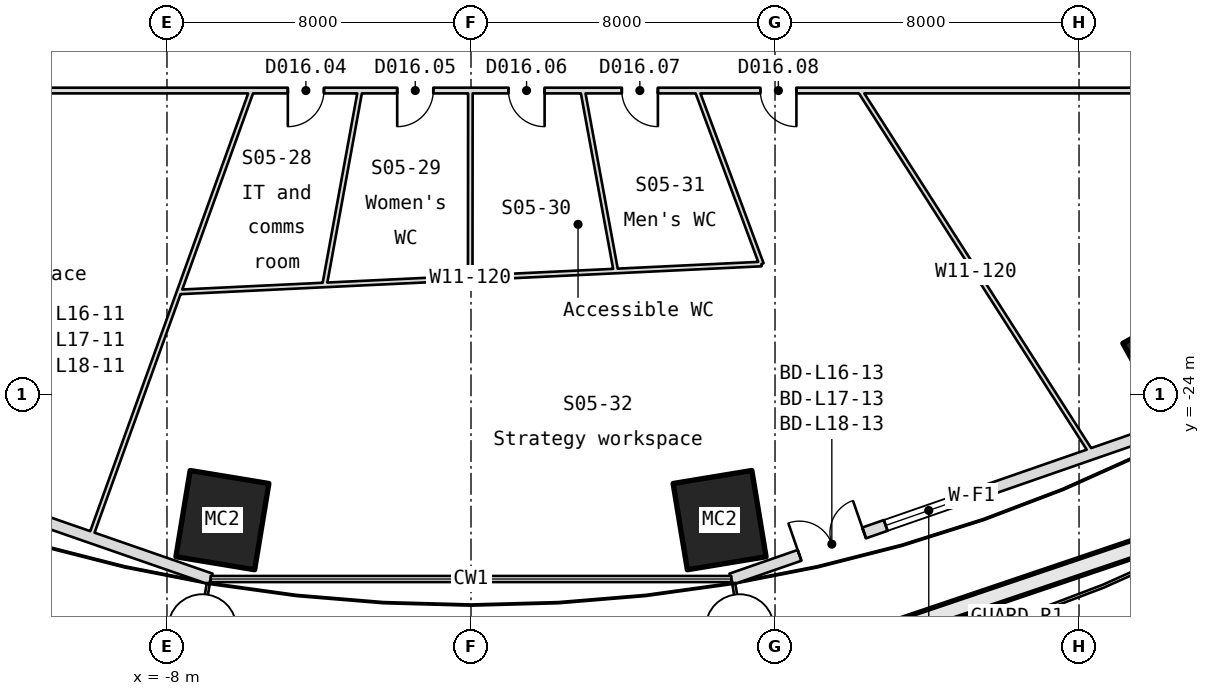
"""IFC4 building model, lengths in metres.
Left out: names, types, materials, properties, quantities, classifications, styles, units other than length and angle.
Written with IfcOpenShell. Run it as: python <this file> out.ifc"""

import sys

from ifc_helpers import new_model, si_unit, direction, frame, frame_2d, origin, origin_2d, place, context, subcontext, project, spatial, rectangle, hollow_rectangle, extrude, element, fill, save


model = new_model("IFC4")
c1 = context("Model", 3, precision=1e-05, world=origin(), true_north=direction((0.0, 1.0)))
c2 = subcontext(c1, "Body", "Model", "MODEL_VIEW")
j1 = project(units=[si_unit("LENGTHUNIT", "METRE"), si_unit("PLANEANGLEUNIT", "RADIAN")], contexts=[c1])
p1 = place(None, origin())
s1 = spatial("IfcSite", under=j1, at=p1, CompositionType="ELEMENT")
p2 = place(p1, origin())
s2 = spatial("IfcBuilding", under=s1, at=p2, CompositionType="ELEMENT")
p3 = place(p2, frame((0.0, 0.0, 82.8)))
s3 = spatial("IfcBuildingStorey", under=s2, at=p3, CompositionType="ELEMENT", Elevation=82.8)
for number, where, z_axis, x_axis in (
    (1, (-6.542, -27.303, -0.18), (0.0, 0.0, 1.0), (-0.987, 0.163, 0.0)),
    (2, (6.542, -27.303, -0.18), (0.0, 0.0, 1.0), (-0.987, -0.163, 0.0)),
    (3, (18.629, -23.146, -0.18), (0.0, 0.0, 1.0), (-0.874, -0.485, 0.0)),
):
    element("IfcColumn", number, at=place(p3, frame(where, z_axis=z_axis, x_axis=x_axis)), inside=s3, PredefinedType="COLUMN", context=c2, shape_type="SweptSolid", body=[
        extrude(hollow_rectangle(XDim=2.1, YDim=2.3, WallThickness=0.085, at=origin_2d()), origin(), (0.0, 0.0, 1.0), 4.15),
    ])
p4 = place(p3, frame((-19.507, -24.46, 0.0), z_axis=(0.0, 0.0, 1.0), x_axis=(0.944722748464, -0.327870292241, 0.0)))
e4 = element("IfcWall", 4, at=p4, inside=s3, PredefinedType="SOLIDWALL", context=c2, shape_type="SweptSolid", body=[
    extrude(rectangle(XDim=13.397, YDim=0.3, at=frame_2d((6.699, 0.0))), origin(), (0.0, 0.0, 1.0), 3.97),
])
p5 = place(p4, frame((1.9, 0.0, 0.0)))
e5 = element("IfcOpeningElement", 5, at=p5, cuts=e4, PredefinedType="OPENING", context=c2, shape_type="SweptSolid", body=[
    extrude(rectangle(XDim=1.8, YDim=2.4, at=frame_2d((0.9, 1.2))), frame((0.0, 0.16, 0.0), z_axis=(0.0, -1.0, 0.0), x_axis=(1.0, 0.0, 0.0)), (0.0, 0.0, 1.0), 0.32),
])
p6 = place(p4, frame((4.3, 0.0, 0.9)))
e6 = element("IfcOpeningElement", 6, at=p6, cuts=e4, PredefinedType="OPENING", context=c2, shape_type="SweptSolid", body=[
    extrude(rectangle(XDim=2.4, YDim=1.5, at=frame_2d((1.2, 0.75))), frame((0.0, 0.16, 0.0), z_axis=(0.0, -1.0, 0.0), x_axis=(1.0, 0.0, 0.0)), (0.0, 0.0, 1.0), 0.32),
])
p7 = place(p3, frame((6.85, -28.853, 0.0), z_axis=(0.0, 0.0, 1.0), x_axis=(0.944722748464, 0.327870292241, 0.0)))
e7 = element("IfcWall", 7, at=p7, inside=s3, PredefinedType="SOLIDWALL", context=c2, shape_type="SweptSolid", body=[
    extrude(rectangle(XDim=13.397, YDim=0.3, at=frame_2d((6.699, 0.0))), origin(), (0.0, 0.0, 1.0), 3.97),
])
p8 = place(p7, frame((1.9, 0.0, 0.0)))
e8 = element("IfcOpeningElement", 8, at=p8, cuts=e7, PredefinedType="OPENING", context=c2, shape_type="SweptSolid", body=[
    extrude(rectangle(XDim=1.8, YDim=2.4, at=frame_2d((0.9, 1.2))), frame((0.0, 0.16, 0.0), z_axis=(0.0, -1.0, 0.0), x_axis=(1.0, 0.0, 0.0)), (0.0, 0.0, 1.0), 0.32),
])
p9 = place(p7, frame((4.3, 0.0, 0.9)))
e9 = element("IfcOpeningElement", 9, at=p9, cuts=e7, PredefinedType="OPENING", context=c2, shape_type="SweptSolid", body=[
    extrude(rectangle(XDim=2.4, YDim=1.5, at=frame_2d((1.2, 0.75))), frame((0.0, 0.16, 0.0), z_axis=(0.0, -1.0, 0.0), x_axis=(1.0, 0.0, 0.0)), (0.0, 0.0, 1.0), 0.32),
])
p10 = place(p3, frame((-7.684, -21.299, 0.0), z_axis=(0.0, 0.0, 1.0), x_axis=(0.998854128079, 0.04785844564, 0.0)))
e10 = element("IfcWall", 10, at=p10, inside=s3, PredefinedType="PARTITIONING", context=c2, shape_type="SweptSolid", body=[
    extrude(rectangle(XDim=15.345, YDim=0.12, at=frame_2d((7.672, 0.0))), origin(), (0.0, 0.0, 1.0), 3.97),
])
p11 = place(p3, frame((-5.772, -16.0, 0.0), z_axis=(0.0, 0.0, 1.0), x_axis=(-0.339354475961, -0.940658566987, 0.0)))
e11 = element("IfcWall", 11, at=p11, inside=s3, PredefinedType="PARTITIONING", context=c2, shape_type="SweptSolid", body=[
    extrude(rectangle(XDim=12.496, YDim=0.12, at=frame_2d((6.248, 0.0))), origin(), (0.0, 0.0, 1.0), 3.97),
])
p12 = place(p3, frame((-3.852, -21.115, 0.0), z_axis=(0.0, 0.0, 1.0), x_axis=(0.179447320467, 0.983767583923, 0.0)))
e12 = element("IfcWall", 12, at=p12, inside=s3, PredefinedType="PARTITIONING", context=c2, shape_type="SweptSolid", body=[
    extrude(rectangle(XDim=5.2, YDim=0.12, at=frame_2d((2.6, 0.0))), origin(), (0.0, 0.0, 1.0), 3.97),
])
p13 = place(p3, frame((-0.021, -20.932, 0.0), z_axis=(0.0, 0.0, 1.0), x_axis=(0.000940547082, 0.999999557685, 0.0)))
e13 = element("IfcWall", 13, at=p13, inside=s3, PredefinedType="PARTITIONING", context=c2, shape_type="SweptSolid", body=[
    extrude(rectangle(XDim=4.932, YDim=0.12, at=frame_2d((2.466, 0.0))), origin(), (0.0, 0.0, 1.0), 3.358),
])
p14 = place(p3, frame((3.811, -20.748, 0.0), z_axis=(0.0, 0.0, 1.0), x_axis=(-0.180687461344, 0.983540564142, 0.0)))
e14 = element("IfcWall", 14, at=p14, inside=s3, PredefinedType="PARTITIONING", context=c2, shape_type="SweptSolid", body=[
    extrude(rectangle(XDim=4.828, YDim=0.12, at=frame_2d((2.414, 0.0))), origin(), (0.0, 0.0, 1.0), 3.97),
])
p15 = place(p3, frame((7.643, -20.565, 0.0), z_axis=(0.0, 0.0, 1.0), x_axis=(-0.348380368387, 0.93735325194, 0.0)))
e15 = element("IfcWall", 15, at=p15, inside=s3, PredefinedType="PARTITIONING", context=c2, shape_type="SweptSolid", body=[
    extrude(rectangle(XDim=4.87, YDim=0.12, at=frame_2d((2.435, 0.0))), origin(), (0.0, 0.0, 1.0), 3.97),
])
p16 = place(p3, frame((10.231, -16.0, 0.0), z_axis=(0.0, 0.0, 1.0), x_axis=(0.538717793893, -0.84248628389, 0.0)))
e16 = element("IfcWall", 16, at=p16, inside=s3, PredefinedType="PARTITIONING", context=c2, shape_type="SweptSolid", body=[
    extrude(rectangle(XDim=11.345, YDim=0.12, at=frame_2d((5.673, 0.0))), origin(), (0.0, 0.0, 1.0), 3.97),
])
p17 = place(p3, frame((19.0, -16.0, 0.0), z_axis=(0.0, 0.0, 1.0), x_axis=(-1.0, 0.0, 0.0)))
e17 = element("IfcWall", 17, at=p17, inside=s3, PredefinedType="PARTITIONING", context=c2, shape_type="SweptSolid", body=[
    extrude(rectangle(XDim=38.0, YDim=0.15, at=frame_2d((19.0, 0.0))), origin(), (0.0, 0.0, 1.0), 3.97),
])
p18 = place(p17, frame((30.486, 0.0, 0.0)))
e18 = element("IfcOpeningElement", 18, at=p18, cuts=e17, PredefinedType="OPENING", context=c2, shape_type="SweptSolid", body=[
    extrude(rectangle(XDim=1.8, YDim=2.1, at=frame_2d((0.9, 1.05))), frame((0.0, 0.085, 0.0), z_axis=(0.0, -1.0, 0.0), x_axis=(1.0, 0.0, 0.0)), (0.0, 0.0, 1.0), 0.17),
])
p19 = place(p17, frame((22.87, 0.0, 0.0)))
e19 = element("IfcOpeningElement", 19, at=p19, cuts=e17, PredefinedType="OPENING", context=c2, shape_type="SweptSolid", body=[
    extrude(rectangle(XDim=0.95, YDim=2.1, at=frame_2d((0.475, 1.05))), frame((0.0, 0.085, 0.0), z_axis=(0.0, -1.0, 0.0), x_axis=(1.0, 0.0, 0.0)), (0.0, 0.0, 1.0), 0.17),
])
p20 = place(p17, frame((19.992, 0.0, 0.0)))
e20 = element("IfcOpeningElement", 20, at=p20, cuts=e17, PredefinedType="OPENING", context=c2, shape_type="SweptSolid", body=[
    extrude(rectangle(XDim=0.95, YDim=2.1, at=frame_2d((0.475, 1.05))), frame((0.0, 0.085, 0.0), z_axis=(0.0, -1.0, 0.0), x_axis=(1.0, 0.0, 0.0)), (0.0, 0.0, 1.0), 0.17),
])
p21 = place(p17, frame((17.063, 0.0, 0.0)))
e21 = element("IfcOpeningElement", 21, at=p21, cuts=e17, PredefinedType="OPENING", context=c2, shape_type="SweptSolid", body=[
    extrude(rectangle(XDim=0.95, YDim=2.1, at=frame_2d((0.475, 1.05))), frame((0.0, 0.085, 0.0), z_axis=(0.0, -1.0, 0.0), x_axis=(1.0, 0.0, 0.0)), (0.0, 0.0, 1.0), 0.17),
])
p22 = place(p17, frame((14.082, 0.0, 0.0)))
e22 = element("IfcOpeningElement", 22, at=p22, cuts=e17, PredefinedType="OPENING", context=c2, shape_type="SweptSolid", body=[
    extrude(rectangle(XDim=0.95, YDim=2.1, at=frame_2d((0.475, 1.05))), frame((0.0, 0.085, 0.0), z_axis=(0.0, -1.0, 0.0), x_axis=(1.0, 0.0, 0.0)), (0.0, 0.0, 1.0), 0.17),
])
p23 = place(p17, frame((10.437, 0.0, 0.0)))
e23 = element("IfcOpeningElement", 23, at=p23, cuts=e17, PredefinedType="OPENING", context=c2, shape_type="SweptSolid", body=[
    extrude(rectangle(XDim=0.95, YDim=2.1, at=frame_2d((0.475, 1.05))), frame((0.0, 0.085, 0.0), z_axis=(0.0, -1.0, 0.0), x_axis=(1.0, 0.0, 0.0)), (0.0, 0.0, 1.0), 0.17),
])
p24 = place(p8, origin())
e24 = element("IfcDoor", 24, at=p24, inside=s3, OperationType="SINGLE_SWING_LEFT", PredefinedType="DOOR", context=c2, shape_type="SweptSolid", body=[
    extrude(rectangle(XDim=1.8, YDim=2.4, at=frame_2d((0.9, 1.2))), frame((0.0, 0.025, 0.0), z_axis=(0.0, -1.0, 0.0), x_axis=(1.0, 0.0, 0.0)), (0.0, 0.0, 1.0), 0.05),
])
fill(e8, e24)
p25 = place(p9, origin())
e25 = element("IfcWindow", 25, at=p25, inside=s3, PartitioningType="SINGLE_PANEL", PredefinedType="WINDOW", context=c2, shape_type="SweptSolid", body=[
    extrude(rectangle(XDim=2.4, YDim=1.5, at=frame_2d((1.2, 0.75))), frame((0.0, 0.03, 0.0), z_axis=(0.0, -1.0, 0.0), x_axis=(1.0, 0.0, 0.0)), (0.0, 0.0, 1.0), 0.06),
])
fill(e9, e25)
p26 = place(p19, origin())
e26 = element("IfcDoor", 26, at=p26, inside=s3, OperationType="SINGLE_SWING_RIGHT", PredefinedType="DOOR", context=c2, shape_type="SweptSolid", body=[
    extrude(rectangle(XDim=0.95, YDim=2.1, at=frame_2d((0.475, 1.05))), frame((0.0, 0.025, 0.0), z_axis=(0.0, -1.0, 0.0), x_axis=(1.0, 0.0, 0.0)), (0.0, 0.0, 1.0), 0.05),
])
fill(e19, e26)
p27 = place(p20, origin())
e27 = element("IfcDoor", 27, at=p27, inside=s3, OperationType="SINGLE_SWING_RIGHT", PredefinedType="DOOR", context=c2, shape_type="SweptSolid", body=[
    extrude(rectangle(XDim=0.95, YDim=2.1, at=frame_2d((0.475, 1.05))), frame((0.0, 0.025, 0.0), z_axis=(0.0, -1.0, 0.0), x_axis=(1.0, 0.0, 0.0)), (0.0, 0.0, 1.0), 0.05),
])
fill(e20, e27)
p28 = place(p21, origin())
e28 = element("IfcDoor", 28, at=p28, inside=s3, OperationType="SINGLE_SWING_RIGHT", PredefinedType="DOOR", context=c2, shape_type="SweptSolid", body=[
    extrude(rectangle(XDim=0.95, YDim=2.1, at=frame_2d((0.475, 1.05))), frame((0.0, 0.025, 0.0), z_axis=(0.0, -1.0, 0.0), x_axis=(1.0, 0.0, 0.0)), (0.0, 0.0, 1.0), 0.05),
])
fill(e21, e28)
p29 = place(p22, origin())
e29 = element("IfcDoor", 29, at=p29, inside=s3, OperationType="SINGLE_SWING_RIGHT", PredefinedType="DOOR", context=c2, shape_type="SweptSolid", body=[
    extrude(rectangle(XDim=0.95, YDim=2.1, at=frame_2d((0.475, 1.05))), frame((0.0, 0.025, 0.0), z_axis=(0.0, -1.0, 0.0), x_axis=(1.0, 0.0, 0.0)), (0.0, 0.0, 1.0), 0.05),
])
fill(e22, e29)
p30 = place(p23, origin())
e30 = element("IfcDoor", 30, at=p30, inside=s3, OperationType="SINGLE_SWING_RIGHT", PredefinedType="DOOR", context=c2, shape_type="SweptSolid", body=[
    extrude(rectangle(XDim=0.95, YDim=2.1, at=frame_2d((0.475, 1.05))), frame((0.0, 0.025, 0.0), z_axis=(0.0, -1.0, 0.0), x_axis=(1.0, 0.0, 0.0)), (0.0, 0.0, 1.0), 0.05),
])
fill(e23, e30)
save(model, sys.argv[1])
